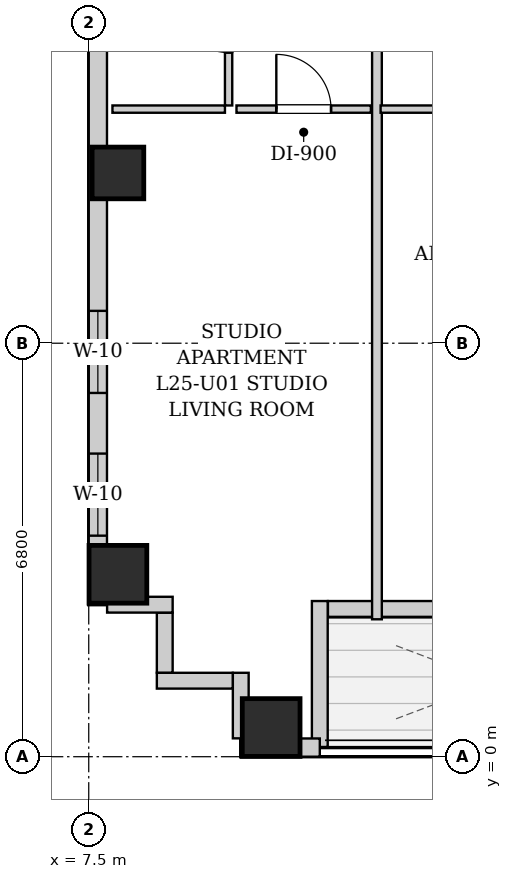
"""IFC4 building model, lengths in metres.
Left out: names, types, materials, properties, quantities, classifications, styles, units other than length and angle.
Written with IfcOpenShell. Run it as: python <this file> out.ifc"""

import sys

from ifc_helpers import new_model, si_unit, direction, frame, frame_2d, origin, origin_2d, place, context, subcontext, project, spatial, rectangle, extrude, element, fill, save


model = new_model("IFC4")
c1 = context("Model", 3, precision=1e-05, world=origin(), true_north=direction((0.0, 1.0)))
c2 = subcontext(c1, "Body", "Model", "MODEL_VIEW")
j1 = project(units=[si_unit("LENGTHUNIT", "METRE"), si_unit("PLANEANGLEUNIT", "RADIAN")], contexts=[c1])
p1 = place(None, origin())
s1 = spatial("IfcSite", under=j1, at=p1, CompositionType="ELEMENT")
p2 = place(p1, origin())
s2 = spatial("IfcBuilding", under=s1, at=p2, CompositionType="ELEMENT")
p3 = place(p2, frame((0.0, 0.0, 91.1)))
s3 = spatial("IfcBuildingStorey", under=s2, at=p3, CompositionType="ELEMENT", Elevation=91.1)
for number, where, z_axis, x_axis in (
    (1, (10.5, 0.48, 0.0), (0.0, 0.0, 1.0), (1.0, 0.0, 0.0)),
    (2, (7.98, 3.0, 0.0), (0.0, 0.0, 1.0), (1.0, 0.0, 0.0)),
):
    element("IfcColumn", number, at=place(p3, frame(where, z_axis=z_axis, x_axis=x_axis)), inside=s3, PredefinedType="COLUMN", context=c2, shape_type="SweptSolid", body=[
        extrude(rectangle(XDim=0.95, YDim=0.95, at=origin_2d()), origin(), (0.0, 0.0, 1.0), 3.2),
    ])
p4 = place(p3, frame((7.98, 9.6, 0.0), z_axis=(0.0, 0.0, 1.0), x_axis=(1.0, 0.0, 0.0)))
e3 = element("IfcColumn", 3, at=p4, inside=s3, PredefinedType="COLUMN", context=c2, shape_type="SweptSolid", body=[
    extrude(rectangle(XDim=0.85, YDim=0.85, at=origin_2d()), origin(), (0.0, 0.0, 1.0), 3.2),
])
p5 = place(p3, frame((16.866, 2.43, 0.0), z_axis=(0.0, 0.0, 1.0), x_axis=(-1.0, 0.0, 0.0)))
e4 = element("IfcWall", 4, at=p5, inside=s3, PredefinedType="SOLIDWALL", context=c2, shape_type="SweptSolid", body=[
    extrude(rectangle(XDim=5.432, YDim=0.26, at=frame_2d((2.716, 0.0))), origin(), (0.0, 0.0, 1.0), 2.94),
])
p6 = place(p5, frame((2.166, 0.0, 0.0)))
e5 = element("IfcOpeningElement", 5, at=p6, cuts=e4, PredefinedType="OPENING", context=c2, shape_type="SweptSolid", body=[
    extrude(rectangle(XDim=1.1, YDim=2.0, at=frame_2d((0.55, 1.0))), frame((0.0, 0.14, 0.0), z_axis=(0.0, -1.0, 0.0), x_axis=(1.0, 0.0, 0.0)), (0.0, 0.0, 1.0), 0.28),
])
p7 = place(p5, frame((0.556, 0.0, 0.85)))
e6 = element("IfcOpeningElement", 6, at=p7, cuts=e4, PredefinedType="OPENING", context=c2, shape_type="SweptSolid", body=[
    extrude(rectangle(XDim=1.35, YDim=1.65, at=frame_2d((0.675, 0.825))), frame((0.0, 0.14, 0.0), z_axis=(0.0, -1.0, 0.0), x_axis=(1.0, 0.0, 0.0)), (0.0, 0.0, 1.0), 0.28),
])
p8 = place(p3, frame((11.3, 2.56, 0.0), z_axis=(0.0, 0.0, 1.0), x_axis=(0.0, -1.0, 0.0)))
e7 = element("IfcWall", 7, at=p8, inside=s3, PredefinedType="SOLIDWALL", context=c2, shape_type="SweptSolid", body=[
    extrude(rectangle(XDim=2.4, YDim=0.26, at=frame_2d((1.2, 0.0))), origin(), (0.0, 0.0, 1.0), 2.94),
])
p9 = place(p3, frame((11.3, 0.15, 0.0), z_axis=(0.0, 0.0, 1.0), x_axis=(-1.0, 0.0, 0.0)))
e8 = element("IfcWall", 8, at=p9, inside=s3, PredefinedType="SOLIDWALL", context=c2, shape_type="SweptSolid", body=[
    extrude(rectangle(XDim=1.3, YDim=0.3, at=frame_2d((0.65, 0.0))), origin(), (0.0, 0.0, 1.0), 2.94),
])
p10 = place(p3, frame((7.65, 2.5, 0.0), z_axis=(0.0, 0.0, 1.0), x_axis=(0.0, 1.0, 0.0)))
e9 = element("IfcWall", 9, at=p10, inside=s3, PredefinedType="SOLIDWALL", context=c2, shape_type="SweptSolid", body=[
    extrude(rectangle(XDim=12.7, YDim=0.3, at=frame_2d((6.35, 0.0))), origin(), (0.0, 0.0, 1.0), 2.94),
])
p11 = place(p10, frame((3.482, 0.0, 0.55)))
e10 = element("IfcOpeningElement", 10, at=p11, cuts=e9, PredefinedType="OPENING", context=c2, shape_type="SweptSolid", body=[
    extrude(rectangle(XDim=1.35, YDim=1.2, at=frame_2d((0.675, 0.6))), frame((0.0, 0.16, 0.0), z_axis=(0.0, -1.0, 0.0), x_axis=(1.0, 0.0, 0.0)), (0.0, 0.0, 1.0), 0.32),
])
p12 = place(p10, frame((1.135, 0.0, 0.55)))
e11 = element("IfcOpeningElement", 11, at=p12, cuts=e9, PredefinedType="OPENING", context=c2, shape_type="SweptSolid", body=[
    extrude(rectangle(XDim=1.35, YDim=1.2, at=frame_2d((0.675, 0.6))), frame((0.0, 0.16, 0.0), z_axis=(0.0, -1.0, 0.0), x_axis=(1.0, 0.0, 0.0)), (0.0, 0.0, 1.0), 0.32),
])
p13 = place(p3, frame((10.0, 0.302, 0.0), z_axis=(0.0, 0.0, 1.0), x_axis=(0.0, 1.0, 0.0)))
e12 = element("IfcWall", 12, at=p13, inside=s3, PredefinedType="SOLIDWALL", context=c2, shape_type="SweptSolid", body=[
    extrude(rectangle(XDim=1.078, YDim=0.26, at=frame_2d((0.539, 0.0))), origin(), (0.0, 0.0, 1.0), 2.94),
])
p14 = place(p3, frame((9.868, 1.25, 0.0), z_axis=(0.0, 0.0, 1.0), x_axis=(-1.0, 0.0, 0.0)))
e13 = element("IfcWall", 13, at=p14, inside=s3, PredefinedType="SOLIDWALL", context=c2, shape_type="SweptSolid", body=[
    extrude(rectangle(XDim=1.248, YDim=0.26, at=frame_2d((0.624, 0.0))), origin(), (0.0, 0.0, 1.0), 2.94),
])
p15 = place(p3, frame((8.75, 1.382, 0.0), z_axis=(0.0, 0.0, 1.0), x_axis=(0.0, 1.0, 0.0)))
e14 = element("IfcWall", 14, at=p15, inside=s3, PredefinedType="SOLIDWALL", context=c2, shape_type="SweptSolid", body=[
    extrude(rectangle(XDim=0.986, YDim=0.26, at=frame_2d((0.493, 0.0))), origin(), (0.0, 0.0, 1.0), 2.94),
])
p16 = place(p3, frame((8.88, 2.5, 0.0), z_axis=(0.0, 0.0, 1.0), x_axis=(-1.0, 0.0, 0.0)))
e15 = element("IfcWall", 15, at=p16, inside=s3, PredefinedType="SOLIDWALL", context=c2, shape_type="SweptSolid", body=[
    extrude(rectangle(XDim=1.078, YDim=0.26, at=frame_2d((0.539, 0.0))), origin(), (0.0, 0.0, 1.0), 2.94),
])
p17 = place(p3, frame((9.8, 10.71, 0.0), z_axis=(0.0, 0.0, 1.0), x_axis=(0.0, 1.0, 0.0)))
e16 = element("IfcWall", 16, at=p17, inside=s3, PredefinedType="PARTITIONING", context=c2, shape_type="SweptSolid", body=[
    extrude(rectangle(XDim=2.6, YDim=0.12, at=frame_2d((1.3, 0.0))), origin(), (0.0, 0.0, 1.0), 2.94),
])
p18 = place(p17, frame((0.87, 0.0, 0.0)))
e17 = element("IfcOpeningElement", 17, at=p18, cuts=e16, PredefinedType="OPENING", context=c2, shape_type="SweptSolid", body=[
    extrude(rectangle(XDim=0.86, YDim=2.05, at=frame_2d((0.43, 1.025))), frame((0.0, 0.07, 0.0), z_axis=(0.0, -1.0, 0.0), x_axis=(1.0, 0.0, 0.0)), (0.0, 0.0, 1.0), 0.14),
])
p19 = place(p3, frame((7.89, 10.65, 0.0), z_axis=(0.0, 0.0, 1.0), x_axis=(1.0, 0.0, 0.0)))
e18 = element("IfcWall", 18, at=p19, inside=s3, PredefinedType="PARTITIONING", context=c2, shape_type="SweptSolid", body=[
    extrude(rectangle(XDim=1.85, YDim=0.12, at=frame_2d((0.925, 0.0))), origin(), (0.0, 0.0, 1.0), 2.94),
])
p20 = place(p3, frame((9.93, 10.65, 0.0), z_axis=(0.0, 0.0, 1.0), x_axis=(1.0, 0.0, 0.0)))
e19 = element("IfcWall", 19, at=p20, inside=s3, PredefinedType="PARTITIONING", context=c2, shape_type="SweptSolid", body=[
    extrude(rectangle(XDim=2.21, YDim=0.12, at=frame_2d((1.105, 0.0))), origin(), (0.0, 0.0, 1.0), 2.94),
])
p21 = place(p20, frame((0.655, 0.0, 0.0)))
e20 = element("IfcOpeningElement", 20, at=p21, cuts=e19, PredefinedType="OPENING", context=c2, shape_type="SweptSolid", body=[
    extrude(rectangle(XDim=0.9, YDim=2.05, at=frame_2d((0.45, 1.025))), frame((0.0, 0.07, 0.0), z_axis=(0.0, -1.0, 0.0), x_axis=(1.0, 0.0, 0.0)), (0.0, 0.0, 1.0), 0.14),
])
p22 = place(p3, frame((12.24, 2.26, 0.0), z_axis=(0.0, 0.0, 1.0), x_axis=(0.0, 1.0, 0.0)))
e21 = element("IfcWall", 21, at=p22, inside=s3, PredefinedType="PARTITIONING", context=c2, shape_type="SweptSolid", body=[
    extrude(rectangle(XDim=11.05, YDim=0.16, at=frame_2d((5.525, 0.0))), origin(), (0.0, 0.0, 1.0), 2.94),
])
p23 = place(p3, frame((12.3, 10.65, 0.0), z_axis=(0.0, 0.0, 1.0), x_axis=(1.0, 0.0, 0.0)))
e22 = element("IfcWall", 22, at=p23, inside=s3, PredefinedType="PARTITIONING", context=c2, shape_type="SweptSolid", body=[
    extrude(rectangle(XDim=2.4, YDim=0.12, at=frame_2d((1.2, 0.0))), origin(), (0.0, 0.0, 1.0), 2.94),
])
p24 = place(p18, origin())
e23 = element("IfcDoor", 23, at=p24, inside=s3, OperationType="SINGLE_SWING_RIGHT", PredefinedType="DOOR", context=c2, shape_type="SweptSolid", body=[
    extrude(rectangle(XDim=0.86, YDim=2.05, at=frame_2d((0.43, 1.025))), frame((0.0, 0.025, 0.0), z_axis=(0.0, -1.0, 0.0), x_axis=(1.0, 0.0, 0.0)), (0.0, 0.0, 1.0), 0.05),
])
fill(e17, e23)
p25 = place(p21, origin())
e24 = element("IfcDoor", 24, at=p25, inside=s3, OperationType="SINGLE_SWING_LEFT", PredefinedType="DOOR", context=c2, shape_type="SweptSolid", body=[
    extrude(rectangle(XDim=0.9, YDim=2.05, at=frame_2d((0.45, 1.025))), frame((0.0, 0.025, 0.0), z_axis=(0.0, -1.0, 0.0), x_axis=(1.0, 0.0, 0.0)), (0.0, 0.0, 1.0), 0.05),
])
fill(e20, e24)
p26 = place(p11, origin())
e25 = element("IfcWindow", 25, at=p26, inside=s3, PartitioningType="SINGLE_PANEL", PredefinedType="WINDOW", context=c2, shape_type="SweptSolid", body=[
    extrude(rectangle(XDim=1.35, YDim=1.2, at=frame_2d((0.675, 0.6))), frame((0.0, 0.03, 0.0), z_axis=(0.0, -1.0, 0.0), x_axis=(1.0, 0.0, 0.0)), (0.0, 0.0, 1.0), 0.06),
])
fill(e10, e25)
p27 = place(p12, origin())
e26 = element("IfcWindow", 26, at=p27, inside=s3, PartitioningType="SINGLE_PANEL", PredefinedType="WINDOW", context=c2, shape_type="SweptSolid", body=[
    extrude(rectangle(XDim=1.35, YDim=1.2, at=frame_2d((0.675, 0.6))), frame((0.0, 0.03, 0.0), z_axis=(0.0, -1.0, 0.0), x_axis=(1.0, 0.0, 0.0)), (0.0, 0.0, 1.0), 0.06),
])
fill(e11, e26)
save(model, sys.argv[1])
